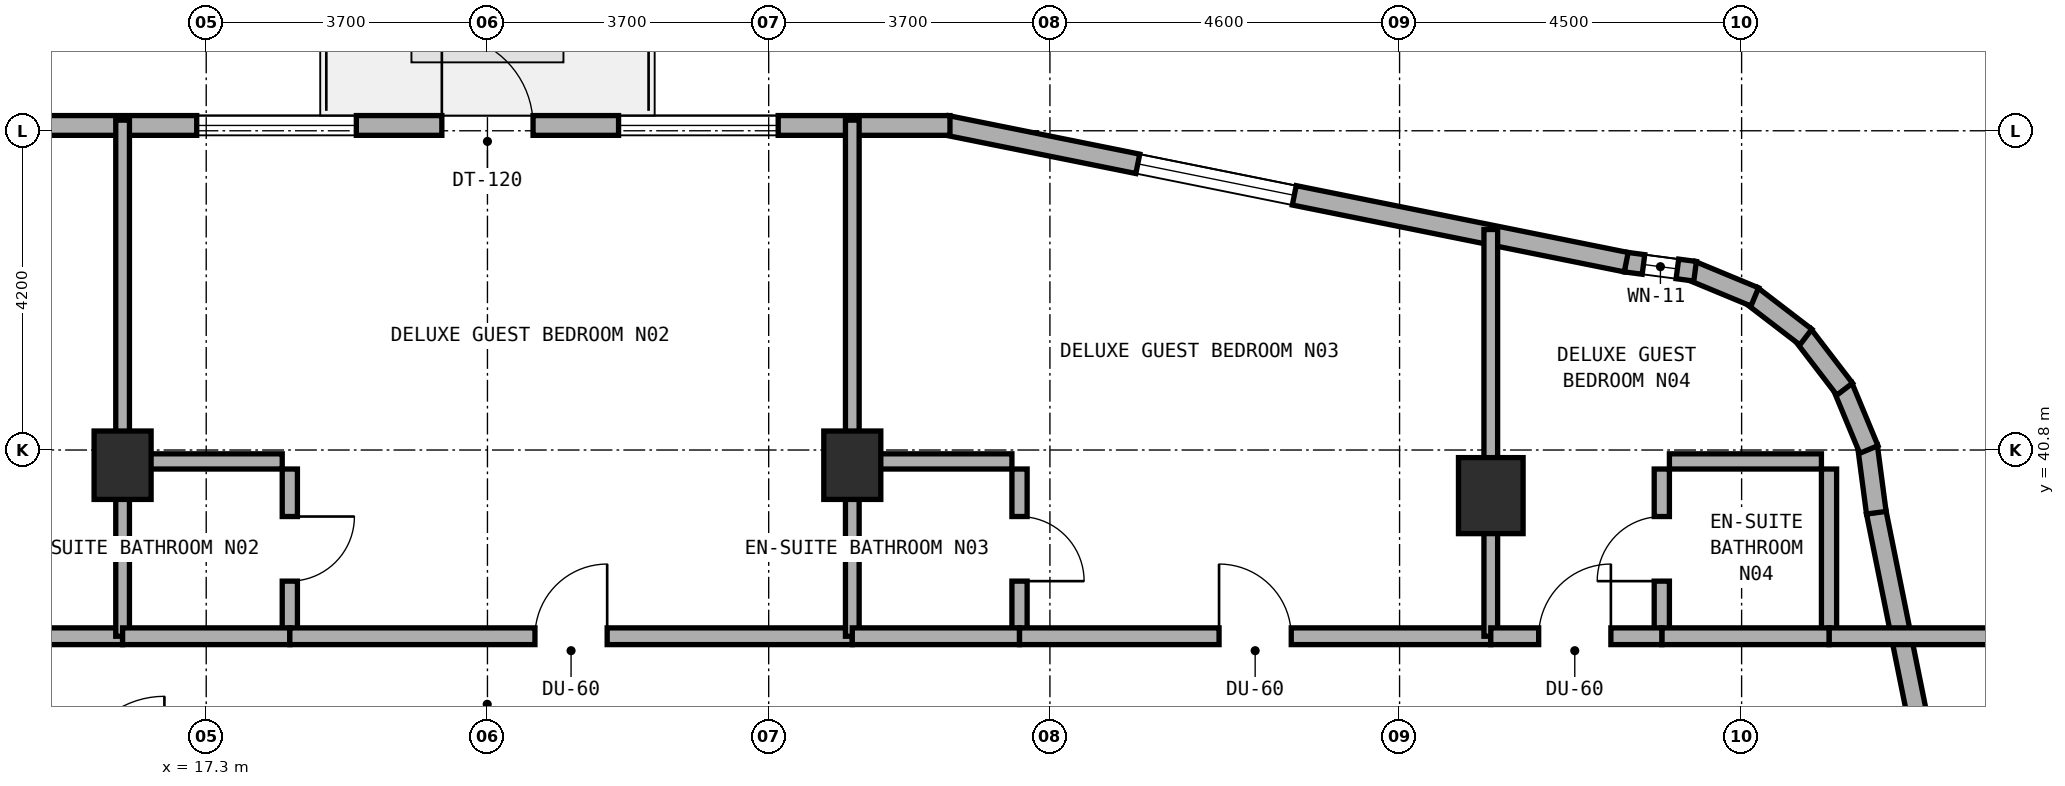
"""IFC4 building model, lengths in metres.
Left out: names, types, materials, properties, quantities, classifications, styles, units other than length and angle.
Written with IfcOpenShell. Run it as: python <this file> out.ifc"""

import sys

from ifc_helpers import new_model, si_unit, direction, frame, frame_2d, origin, origin_2d, place, context, subcontext, project, spatial, rectangle, extrude, element, fill, save


model = new_model("IFC4")
c1 = context("Model", 3, precision=1e-05, world=origin(), true_north=direction((0.0, 1.0)))
c2 = subcontext(c1, "Body", "Model", "MODEL_VIEW")
j1 = project(units=[si_unit("LENGTHUNIT", "METRE"), si_unit("PLANEANGLEUNIT", "RADIAN")], contexts=[c1])
p1 = place(None, origin())
s1 = spatial("IfcSite", under=j1, at=p1, CompositionType="ELEMENT")
p2 = place(p1, origin())
s2 = spatial("IfcBuilding", under=s1, at=p2, CompositionType="ELEMENT")
p3 = place(p2, frame((0.0, 0.0, 155.5)))
s3 = spatial("IfcBuildingStorey", under=s2, at=p3, CompositionType="ELEMENT", Elevation=155.5)
for number, where, z_axis, x_axis in (
    (1, (16.2, 40.6, 0.0), (0.0, 0.0, 1.0), (1.0, 0.0, 0.0)),
    (2, (25.8, 40.6, 0.0), (0.0, 0.0, 1.0), (1.0, 0.0, 0.0)),
):
    element("IfcColumn", number, at=place(p3, frame(where, z_axis=z_axis, x_axis=x_axis)), inside=s3, PredefinedType="COLUMN", context=c2, shape_type="SweptSolid", body=[
        extrude(rectangle(XDim=0.75, YDim=0.9, at=origin_2d()), origin(), (0.0, 0.0, 1.0), 3.5),
    ])
p4 = place(p3, frame((34.2, 40.2, 0.0), z_axis=(0.0, 0.0, 1.0), x_axis=(1.0, 0.0, 0.0)))
e3 = element("IfcColumn", 3, at=p4, inside=s3, PredefinedType="COLUMN", context=c2, shape_type="SweptSolid", body=[
    extrude(rectangle(XDim=0.85, YDim=1.0, at=origin_2d()), origin(), (0.0, 0.0, 1.0), 3.5),
])
p5 = place(p3, frame((41.084, 30.98, 0.0), z_axis=(0.0, 0.0, 1.0), x_axis=(-0.197435082048, 0.980315963543, 0.0)))
e4 = element("IfcWall", 4, at=p5, inside=s3, PredefinedType="STANDARD", context=c2, shape_type="SweptSolid", body=[
    extrude(rectangle(XDim=9.183, YDim=0.26, at=frame_2d((4.591, 0.0))), origin(), (0.0, 0.0, 1.0), 3.22),
])
p6 = place(p5, frame((1.734, 0.0, 0.85)))
e5 = element("IfcOpeningElement", 5, at=p6, cuts=e4, PredefinedType="OPENING", context=c2, shape_type="SweptSolid", body=[
    extrude(rectangle(XDim=2.1, YDim=1.5, at=frame_2d((1.05, 0.75))), frame((0.0, 0.14, 0.0), z_axis=(0.0, -1.0, 0.0), x_axis=(1.0, 0.0, 0.0)), (0.0, 0.0, 1.0), 0.28),
])
p7 = place(p3, frame((39.272, 39.975, 0.0), z_axis=(0.0, 0.0, 1.0), x_axis=(-0.130953706898, 0.991388484223, 0.0)))
e6 = element("IfcWall", 6, at=p7, inside=s3, PredefinedType="STANDARD", context=c2, shape_type="SweptSolid", body=[
    extrude(rectangle(XDim=0.885, YDim=0.26, at=frame_2d((0.443, 0.0))), origin(), (0.0, 0.0, 1.0), 3.22),
])
p8 = place(p3, frame((39.174, 40.807, 0.0), z_axis=(0.0, 0.0, 1.0), x_axis=(-0.383290660547, 0.923627776508, 0.0)))
e7 = element("IfcWall", 7, at=p8, inside=s3, PredefinedType="STANDARD", context=c2, shape_type="SweptSolid", body=[
    extrude(rectangle(XDim=0.903, YDim=0.26, at=frame_2d((0.452, 0.0))), origin(), (0.0, 0.0, 1.0), 3.22),
])
p9 = place(p3, frame((38.856, 41.601, 0.0), z_axis=(0.0, 0.0, 1.0), x_axis=(-0.608624690463, 0.793458244748, 0.0)))
e8 = element("IfcWall", 8, at=p9, inside=s3, PredefinedType="STANDARD", context=c2, shape_type="SweptSolid", body=[
    extrude(rectangle(XDim=0.902, YDim=0.26, at=frame_2d((0.451, 0.0))), origin(), (0.0, 0.0, 1.0), 3.22),
])
p10 = place(p3, frame((38.345, 42.286, 0.0), z_axis=(0.0, 0.0, 1.0), x_axis=(-0.793558456666, 0.608494022858, 0.0)))
e9 = element("IfcWall", 9, at=p10, inside=s3, PredefinedType="STANDARD", context=c2, shape_type="SweptSolid", body=[
    extrude(rectangle(XDim=0.902, YDim=0.26, at=frame_2d((0.451, 0.0))), origin(), (0.0, 0.0, 1.0), 3.22),
])
p11 = place(p3, frame((37.673, 42.814, 0.0), z_axis=(0.0, 0.0, 1.0), x_axis=(-0.923683767999, 0.383155708213, 0.0)))
e10 = element("IfcWall", 10, at=p11, inside=s3, PredefinedType="STANDARD", context=c2, shape_type="SweptSolid", body=[
    extrude(rectangle(XDim=0.903, YDim=0.26, at=frame_2d((0.451, 0.0))), origin(), (0.0, 0.0, 1.0), 3.22),
])
p12 = place(p3, frame((36.888, 43.152, 0.0), z_axis=(0.0, 0.0, 1.0), x_axis=(-0.991487658083, 0.130200706103, 0.0)))
e11 = element("IfcWall", 11, at=p12, inside=s3, PredefinedType="STANDARD", context=c2, shape_type="SweptSolid", body=[
    extrude(rectangle(XDim=0.921, YDim=0.26, at=frame_2d((0.46, 0.0))), origin(), (0.0, 0.0, 1.0), 3.22),
])
p13 = place(p12, frame((0.235, 0.0, 0.85)))
e12 = element("IfcOpeningElement", 12, at=p13, cuts=e11, PredefinedType="OPENING", context=c2, shape_type="SweptSolid", body=[
    extrude(rectangle(XDim=0.45, YDim=1.5, at=frame_2d((0.225, 0.75))), frame((0.0, 0.14, 0.0), z_axis=(0.0, -1.0, 0.0), x_axis=(1.0, 0.0, 0.0)), (0.0, 0.0, 1.0), 0.28),
])
p14 = place(p3, frame((35.982, 43.271, 0.0), z_axis=(0.0, 0.0, 1.0), x_axis=(-0.980317172899, 0.197429077186, 0.0)))
e13 = element("IfcWall", 13, at=p14, inside=s3, PredefinedType="STANDARD", context=c2, shape_type="SweptSolid", body=[
    extrude(rectangle(XDim=9.117, YDim=0.26, at=frame_2d((4.559, 0.0))), origin(), (0.0, 0.0, 1.0), 3.22),
])
p15 = place(p14, frame((4.455, 0.0, 0.85)))
e14 = element("IfcOpeningElement", 14, at=p15, cuts=e13, PredefinedType="OPENING", context=c2, shape_type="SweptSolid", body=[
    extrude(rectangle(XDim=2.1, YDim=1.5, at=frame_2d((1.05, 0.75))), frame((0.0, 0.14, 0.0), z_axis=(0.0, -1.0, 0.0), x_axis=(1.0, 0.0, 0.0)), (0.0, 0.0, 1.0), 0.28),
])
p16 = place(p3, frame((27.085, 45.07, 0.0), z_axis=(0.0, 0.0, 1.0), x_axis=(-1.0, 0.0, 0.0)))
e15 = element("IfcWall", 15, at=p16, inside=s3, PredefinedType="STANDARD", context=c2, shape_type="SweptSolid", body=[
    extrude(rectangle(XDim=12.135, YDim=0.26, at=frame_2d((6.067, 0.0))), origin(), (0.0, 0.0, 1.0), 3.22),
])
p17 = place(p16, frame((5.485, 0.0, 0.0)))
e16 = element("IfcOpeningElement", 16, at=p17, cuts=e15, PredefinedType="OPENING", context=c2, shape_type="SweptSolid", body=[
    extrude(rectangle(XDim=1.2, YDim=2.15, at=frame_2d((0.6, 1.075))), frame((0.0, 0.14, 0.0), z_axis=(0.0, -1.0, 0.0), x_axis=(1.0, 0.0, 0.0)), (0.0, 0.0, 1.0), 0.28),
])
p18 = place(p16, frame((2.26, 0.0, 0.85)))
e17 = element("IfcOpeningElement", 17, at=p18, cuts=e15, PredefinedType="OPENING", context=c2, shape_type="SweptSolid", body=[
    extrude(rectangle(XDim=2.1, YDim=1.5, at=frame_2d((1.05, 0.75))), frame((0.0, 0.14, 0.0), z_axis=(0.0, -1.0, 0.0), x_axis=(1.0, 0.0, 0.0)), (0.0, 0.0, 1.0), 0.28),
])
p19 = place(p16, frame((7.81, 0.0, 0.85)))
e18 = element("IfcOpeningElement", 18, at=p19, cuts=e15, PredefinedType="OPENING", context=c2, shape_type="SweptSolid", body=[
    extrude(rectangle(XDim=2.1, YDim=1.5, at=frame_2d((1.05, 0.75))), frame((0.0, 0.14, 0.0), z_axis=(0.0, -1.0, 0.0), x_axis=(1.0, 0.0, 0.0)), (0.0, 0.0, 1.0), 0.28),
])
p20 = place(p3, frame((5.55, 38.35, 0.0), z_axis=(0.0, 0.0, 1.0), x_axis=(1.0, 0.0, 0.0)))
e19 = element("IfcWall", 19, at=p20, inside=s3, PredefinedType="SOLIDWALL", context=c2, shape_type="SweptSolid", body=[
    extrude(rectangle(XDim=10.65, YDim=0.22, at=frame_2d((5.325, 0.0))), origin(), (0.0, 0.0, 1.0), 2.795),
])
p21 = place(p20, frame((4.85, 0.0, 0.0)))
e20 = element("IfcOpeningElement", 20, at=p21, cuts=e19, PredefinedType="OPENING", context=c2, shape_type="SweptSolid", body=[
    extrude(rectangle(XDim=0.95, YDim=2.1, at=frame_2d((0.475, 1.05))), frame((0.0, 0.12, 0.0), z_axis=(0.0, -1.0, 0.0), x_axis=(1.0, 0.0, 0.0)), (0.0, 0.0, 1.0), 0.24),
])
p22 = place(p3, frame((16.2, 38.35, 0.0), z_axis=(0.0, 0.0, 1.0), x_axis=(0.0, 1.0, 0.0)))
e21 = element("IfcWall", 21, at=p22, inside=s3, PredefinedType="SOLIDWALL", context=c2, shape_type="SweptSolid", body=[
    extrude(rectangle(XDim=6.79, YDim=0.18, at=frame_2d((3.395, 0.0))), origin(), (0.0, 0.0, 1.0), 2.795),
])
p23 = place(p3, frame((18.4, 38.45, 0.0), z_axis=(0.0, 0.0, 1.0), x_axis=(0.0, 1.0, 0.0)))
e22 = element("IfcWall", 22, at=p23, inside=s3, PredefinedType="PLUMBINGWALL", context=c2, shape_type="SweptSolid", body=[
    extrude(rectangle(XDim=2.1, YDim=0.2, at=frame_2d((1.05, 0.0))), origin(), (0.0, 0.0, 1.0), 2.795),
])
p24 = place(p23, frame((0.625, 0.0, 0.0)))
e23 = element("IfcOpeningElement", 23, at=p24, cuts=e22, PredefinedType="OPENING", context=c2, shape_type="SweptSolid", body=[
    extrude(rectangle(XDim=0.85, YDim=2.1, at=frame_2d((0.425, 1.05))), frame((0.0, 0.11, 0.0), z_axis=(0.0, -1.0, 0.0), x_axis=(1.0, 0.0, 0.0)), (0.0, 0.0, 1.0), 0.22),
])
p25 = place(p3, frame((16.3, 40.65, 0.0), z_axis=(0.0, 0.0, 1.0), x_axis=(1.0, 0.0, 0.0)))
e24 = element("IfcWall", 24, at=p25, inside=s3, PredefinedType="PLUMBINGWALL", context=c2, shape_type="SweptSolid", body=[
    extrude(rectangle(XDim=2.0, YDim=0.2, at=frame_2d((1.0, 0.0))), origin(), (0.0, 0.0, 1.0), 2.835),
])
p26 = place(p3, frame((16.2, 38.35, 0.0), z_axis=(0.0, 0.0, 1.0), x_axis=(1.0, 0.0, 0.0)))
e25 = element("IfcWall", 25, at=p26, inside=s3, PredefinedType="SOLIDWALL", context=c2, shape_type="SweptSolid", body=[
    extrude(rectangle(XDim=2.2, YDim=0.22, at=frame_2d((1.1, 0.0))), origin(), (0.0, 0.0, 1.0), 2.795),
])
p27 = place(p3, frame((18.4, 38.35, 0.0), z_axis=(0.0, 0.0, 1.0), x_axis=(1.0, 0.0, 0.0)))
e26 = element("IfcWall", 26, at=p27, inside=s3, PredefinedType="SOLIDWALL", context=c2, shape_type="SweptSolid", body=[
    extrude(rectangle(XDim=7.4, YDim=0.22, at=frame_2d((3.7, 0.0))), origin(), (0.0, 0.0, 1.0), 2.795),
])
p28 = place(p27, frame((3.225, 0.0, 0.0)))
e27 = element("IfcOpeningElement", 27, at=p28, cuts=e26, PredefinedType="OPENING", context=c2, shape_type="SweptSolid", body=[
    extrude(rectangle(XDim=0.95, YDim=2.1, at=frame_2d((0.475, 1.05))), frame((0.0, 0.12, 0.0), z_axis=(0.0, -1.0, 0.0), x_axis=(1.0, 0.0, 0.0)), (0.0, 0.0, 1.0), 0.24),
])
p29 = place(p3, frame((25.8, 38.35, 0.0), z_axis=(0.0, 0.0, 1.0), x_axis=(0.0, 1.0, 0.0)))
e28 = element("IfcWall", 28, at=p29, inside=s3, PredefinedType="SOLIDWALL", context=c2, shape_type="SweptSolid", body=[
    extrude(rectangle(XDim=6.79, YDim=0.18, at=frame_2d((3.395, 0.0))), origin(), (0.0, 0.0, 1.0), 2.795),
])
p30 = place(p3, frame((28.0, 38.45, 0.0), z_axis=(0.0, 0.0, 1.0), x_axis=(0.0, 1.0, 0.0)))
e29 = element("IfcWall", 29, at=p30, inside=s3, PredefinedType="PLUMBINGWALL", context=c2, shape_type="SweptSolid", body=[
    extrude(rectangle(XDim=2.1, YDim=0.2, at=frame_2d((1.05, 0.0))), origin(), (0.0, 0.0, 1.0), 2.795),
])
p31 = place(p30, frame((0.625, 0.0, 0.0)))
e30 = element("IfcOpeningElement", 30, at=p31, cuts=e29, PredefinedType="OPENING", context=c2, shape_type="SweptSolid", body=[
    extrude(rectangle(XDim=0.85, YDim=2.1, at=frame_2d((0.425, 1.05))), frame((0.0, 0.11, 0.0), z_axis=(0.0, -1.0, 0.0), x_axis=(1.0, 0.0, 0.0)), (0.0, 0.0, 1.0), 0.22),
])
p32 = place(p3, frame((25.9, 40.65, 0.0), z_axis=(0.0, 0.0, 1.0), x_axis=(1.0, 0.0, 0.0)))
e31 = element("IfcWall", 31, at=p32, inside=s3, PredefinedType="PLUMBINGWALL", context=c2, shape_type="SweptSolid", body=[
    extrude(rectangle(XDim=2.0, YDim=0.2, at=frame_2d((1.0, 0.0))), origin(), (0.0, 0.0, 1.0), 2.835),
])
p33 = place(p3, frame((25.8, 38.35, 0.0), z_axis=(0.0, 0.0, 1.0), x_axis=(1.0, 0.0, 0.0)))
e32 = element("IfcWall", 32, at=p33, inside=s3, PredefinedType="SOLIDWALL", context=c2, shape_type="SweptSolid", body=[
    extrude(rectangle(XDim=2.2, YDim=0.22, at=frame_2d((1.1, 0.0))), origin(), (0.0, 0.0, 1.0), 2.795),
])
p34 = place(p3, frame((28.0, 38.35, 0.0), z_axis=(0.0, 0.0, 1.0), x_axis=(1.0, 0.0, 0.0)))
e33 = element("IfcWall", 33, at=p34, inside=s3, PredefinedType="SOLIDWALL", context=c2, shape_type="SweptSolid", body=[
    extrude(rectangle(XDim=6.2, YDim=0.22, at=frame_2d((3.1, 0.0))), origin(), (0.0, 0.0, 1.0), 2.795),
])
p35 = place(p34, frame((2.625, 0.0, 0.0)))
e34 = element("IfcOpeningElement", 34, at=p35, cuts=e33, PredefinedType="OPENING", context=c2, shape_type="SweptSolid", body=[
    extrude(rectangle(XDim=0.95, YDim=2.1, at=frame_2d((0.475, 1.05))), frame((0.0, 0.12, 0.0), z_axis=(0.0, -1.0, 0.0), x_axis=(1.0, 0.0, 0.0)), (0.0, 0.0, 1.0), 0.24),
])
p36 = place(p3, frame((34.2, 38.35, 0.0), z_axis=(0.0, 0.0, 1.0), x_axis=(0.0, 1.0, 0.0)))
e35 = element("IfcWall", 35, at=p36, inside=s3, PredefinedType="SOLIDWALL", context=c2, shape_type="SweptSolid", body=[
    extrude(rectangle(XDim=5.351, YDim=0.18, at=frame_2d((2.675, 0.0))), origin(), (0.0, 0.0, 1.0), 2.795),
])
p37 = place(p3, frame((36.45, 38.45, 0.0), z_axis=(0.0, 0.0, 1.0), x_axis=(0.0, 1.0, 0.0)))
e36 = element("IfcWall", 36, at=p37, inside=s3, PredefinedType="PLUMBINGWALL", context=c2, shape_type="SweptSolid", body=[
    extrude(rectangle(XDim=2.1, YDim=0.2, at=frame_2d((1.05, 0.0))), origin(), (0.0, 0.0, 1.0), 3.22),
])
p38 = place(p37, frame((0.625, 0.0, 0.0)))
e37 = element("IfcOpeningElement", 37, at=p38, cuts=e36, PredefinedType="OPENING", context=c2, shape_type="SweptSolid", body=[
    extrude(rectangle(XDim=0.85, YDim=2.1, at=frame_2d((0.425, 1.05))), frame((0.0, 0.11, 0.0), z_axis=(0.0, -1.0, 0.0), x_axis=(1.0, 0.0, 0.0)), (0.0, 0.0, 1.0), 0.22),
])
p39 = place(p3, frame((36.55, 40.65, 0.0), z_axis=(0.0, 0.0, 1.0), x_axis=(1.0, 0.0, 0.0)))
e38 = element("IfcWall", 38, at=p39, inside=s3, PredefinedType="PLUMBINGWALL", context=c2, shape_type="SweptSolid", body=[
    extrude(rectangle(XDim=2.0, YDim=0.2, at=frame_2d((1.0, 0.0))), origin(), (0.0, 0.0, 1.0), 3.22),
])
p40 = place(p3, frame((38.65, 38.45, 0.0), z_axis=(0.0, 0.0, 1.0), x_axis=(0.0, 1.0, 0.0)))
e39 = element("IfcWall", 39, at=p40, inside=s3, PredefinedType="PLUMBINGWALL", context=c2, shape_type="SweptSolid", body=[
    extrude(rectangle(XDim=2.1, YDim=0.2, at=frame_2d((1.05, 0.0))), origin(), (0.0, 0.0, 1.0), 3.22),
])
p41 = place(p3, frame((38.65, 38.35, 0.0), z_axis=(0.0, 0.0, 1.0), x_axis=(1.0, 0.0, 0.0)))
e40 = element("IfcWall", 40, at=p41, inside=s3, PredefinedType="SOLIDWALL", context=c2, shape_type="SweptSolid", body=[
    extrude(rectangle(XDim=2.39, YDim=0.22, at=frame_2d((1.195, 0.0))), origin(), (0.0, 0.0, 1.0), 3.22),
])
p42 = place(p3, frame((36.45, 38.35, 0.0), z_axis=(0.0, 0.0, 1.0), x_axis=(1.0, 0.0, 0.0)))
e41 = element("IfcWall", 41, at=p42, inside=s3, PredefinedType="SOLIDWALL", context=c2, shape_type="SweptSolid", body=[
    extrude(rectangle(XDim=2.2, YDim=0.22, at=frame_2d((1.1, 0.0))), origin(), (0.0, 0.0, 1.0), 3.22),
])
p43 = place(p3, frame((34.2, 38.35, 0.0), z_axis=(0.0, 0.0, 1.0), x_axis=(1.0, 0.0, 0.0)))
e42 = element("IfcWall", 42, at=p43, inside=s3, PredefinedType="SOLIDWALL", context=c2, shape_type="SweptSolid", body=[
    extrude(rectangle(XDim=2.25, YDim=0.22, at=frame_2d((1.125, 0.0))), origin(), (0.0, 0.0, 1.0), 2.795),
])
p44 = place(p43, frame((0.63, 0.0, 0.0)))
e43 = element("IfcOpeningElement", 43, at=p44, cuts=e42, PredefinedType="OPENING", context=c2, shape_type="SweptSolid", body=[
    extrude(rectangle(XDim=0.95, YDim=2.1, at=frame_2d((0.475, 1.05))), frame((0.0, 0.12, 0.0), z_axis=(0.0, -1.0, 0.0), x_axis=(1.0, 0.0, 0.0)), (0.0, 0.0, 1.0), 0.24),
])
p45 = place(p15, origin())
e44 = element("IfcWindow", 44, at=p45, inside=s3, PartitioningType="SINGLE_PANEL", PredefinedType="WINDOW", context=c2, shape_type="SweptSolid", body=[
    extrude(rectangle(XDim=2.1, YDim=1.5, at=frame_2d((1.05, 0.75))), frame((0.0, 0.03, 0.0), z_axis=(0.0, -1.0, 0.0), x_axis=(1.0, 0.0, 0.0)), (0.0, 0.0, 1.0), 0.06),
])
fill(e14, e44)
p46 = place(p17, frame((1.2, 0.0, 0.0), z_axis=(0.0, 0.0, 1.0), x_axis=(-1.0, 0.0, 0.0)))
e45 = element("IfcDoor", 45, at=p46, inside=s3, OperationType="SINGLE_SWING_LEFT", PredefinedType="DOOR", context=c2, shape_type="SweptSolid", body=[
    extrude(rectangle(XDim=1.2, YDim=2.15, at=frame_2d((0.6, 1.075))), frame((0.0, 0.025, 0.0), z_axis=(0.0, -1.0, 0.0), x_axis=(1.0, 0.0, 0.0)), (0.0, 0.0, 1.0), 0.05),
])
fill(e16, e45)
p47 = place(p18, origin())
e46 = element("IfcWindow", 46, at=p47, inside=s3, PartitioningType="SINGLE_PANEL", PredefinedType="WINDOW", context=c2, shape_type="SweptSolid", body=[
    extrude(rectangle(XDim=2.1, YDim=1.5, at=frame_2d((1.05, 0.75))), frame((0.0, 0.03, 0.0), z_axis=(0.0, -1.0, 0.0), x_axis=(1.0, 0.0, 0.0)), (0.0, 0.0, 1.0), 0.06),
])
fill(e17, e46)
p48 = place(p19, origin())
e47 = element("IfcWindow", 47, at=p48, inside=s3, PartitioningType="SINGLE_PANEL", PredefinedType="WINDOW", context=c2, shape_type="SweptSolid", body=[
    extrude(rectangle(XDim=2.1, YDim=1.5, at=frame_2d((1.05, 0.75))), frame((0.0, 0.03, 0.0), z_axis=(0.0, -1.0, 0.0), x_axis=(1.0, 0.0, 0.0)), (0.0, 0.0, 1.0), 0.06),
])
fill(e18, e47)
p49 = place(p13, origin())
e48 = element("IfcWindow", 48, at=p49, inside=s3, PartitioningType="SINGLE_PANEL", PredefinedType="WINDOW", context=c2, shape_type="SweptSolid", body=[
    extrude(rectangle(XDim=0.45, YDim=1.5, at=frame_2d((0.225, 0.75))), frame((0.0, 0.03, 0.0), z_axis=(0.0, -1.0, 0.0), x_axis=(1.0, 0.0, 0.0)), (0.0, 0.0, 1.0), 0.06),
])
fill(e12, e48)
p50 = place(p24, frame((0.85, 0.0, 0.0), z_axis=(0.0, 0.0, 1.0), x_axis=(-1.0, 0.0, 0.0)))
e49 = element("IfcDoor", 49, at=p50, inside=s3, OperationType="SINGLE_SWING_LEFT", PredefinedType="DOOR", context=c2, shape_type="SweptSolid", body=[
    extrude(rectangle(XDim=0.85, YDim=2.1, at=frame_2d((0.425, 1.05))), frame((0.0, 0.025, 0.0), z_axis=(0.0, -1.0, 0.0), x_axis=(1.0, 0.0, 0.0)), (0.0, 0.0, 1.0), 0.05),
])
fill(e23, e49)
p51 = place(p28, origin())
e50 = element("IfcDoor", 50, at=p51, inside=s3, OperationType="SINGLE_SWING_RIGHT", PredefinedType="DOOR", context=c2, shape_type="SweptSolid", body=[
    extrude(rectangle(XDim=0.95, YDim=2.1, at=frame_2d((0.475, 1.05))), frame((0.0, 0.025, 0.0), z_axis=(0.0, -1.0, 0.0), x_axis=(1.0, 0.0, 0.0)), (0.0, 0.0, 1.0), 0.05),
])
fill(e27, e50)
p52 = place(p31, frame((0.85, 0.0, 0.0), z_axis=(0.0, 0.0, 1.0), x_axis=(-1.0, 0.0, 0.0)))
e51 = element("IfcDoor", 51, at=p52, inside=s3, OperationType="SINGLE_SWING_RIGHT", PredefinedType="DOOR", context=c2, shape_type="SweptSolid", body=[
    extrude(rectangle(XDim=0.85, YDim=2.1, at=frame_2d((0.425, 1.05))), frame((0.0, 0.025, 0.0), z_axis=(0.0, -1.0, 0.0), x_axis=(1.0, 0.0, 0.0)), (0.0, 0.0, 1.0), 0.05),
])
fill(e30, e51)
p53 = place(p35, origin())
e52 = element("IfcDoor", 52, at=p53, inside=s3, OperationType="SINGLE_SWING_LEFT", PredefinedType="DOOR", context=c2, shape_type="SweptSolid", body=[
    extrude(rectangle(XDim=0.95, YDim=2.1, at=frame_2d((0.475, 1.05))), frame((0.0, 0.025, 0.0), z_axis=(0.0, -1.0, 0.0), x_axis=(1.0, 0.0, 0.0)), (0.0, 0.0, 1.0), 0.05),
])
fill(e34, e52)
p54 = place(p38, origin())
e53 = element("IfcDoor", 53, at=p54, inside=s3, OperationType="SINGLE_SWING_LEFT", PredefinedType="DOOR", context=c2, shape_type="SweptSolid", body=[
    extrude(rectangle(XDim=0.85, YDim=2.1, at=frame_2d((0.425, 1.05))), frame((0.0, 0.025, 0.0), z_axis=(0.0, -1.0, 0.0), x_axis=(1.0, 0.0, 0.0)), (0.0, 0.0, 1.0), 0.05),
])
fill(e37, e53)
p55 = place(p44, origin())
e54 = element("IfcDoor", 54, at=p55, inside=s3, OperationType="SINGLE_SWING_RIGHT", PredefinedType="DOOR", context=c2, shape_type="SweptSolid", body=[
    extrude(rectangle(XDim=0.95, YDim=2.1, at=frame_2d((0.475, 1.05))), frame((0.0, 0.025, 0.0), z_axis=(0.0, -1.0, 0.0), x_axis=(1.0, 0.0, 0.0)), (0.0, 0.0, 1.0), 0.05),
])
fill(e43, e54)
save(model, sys.argv[1])
